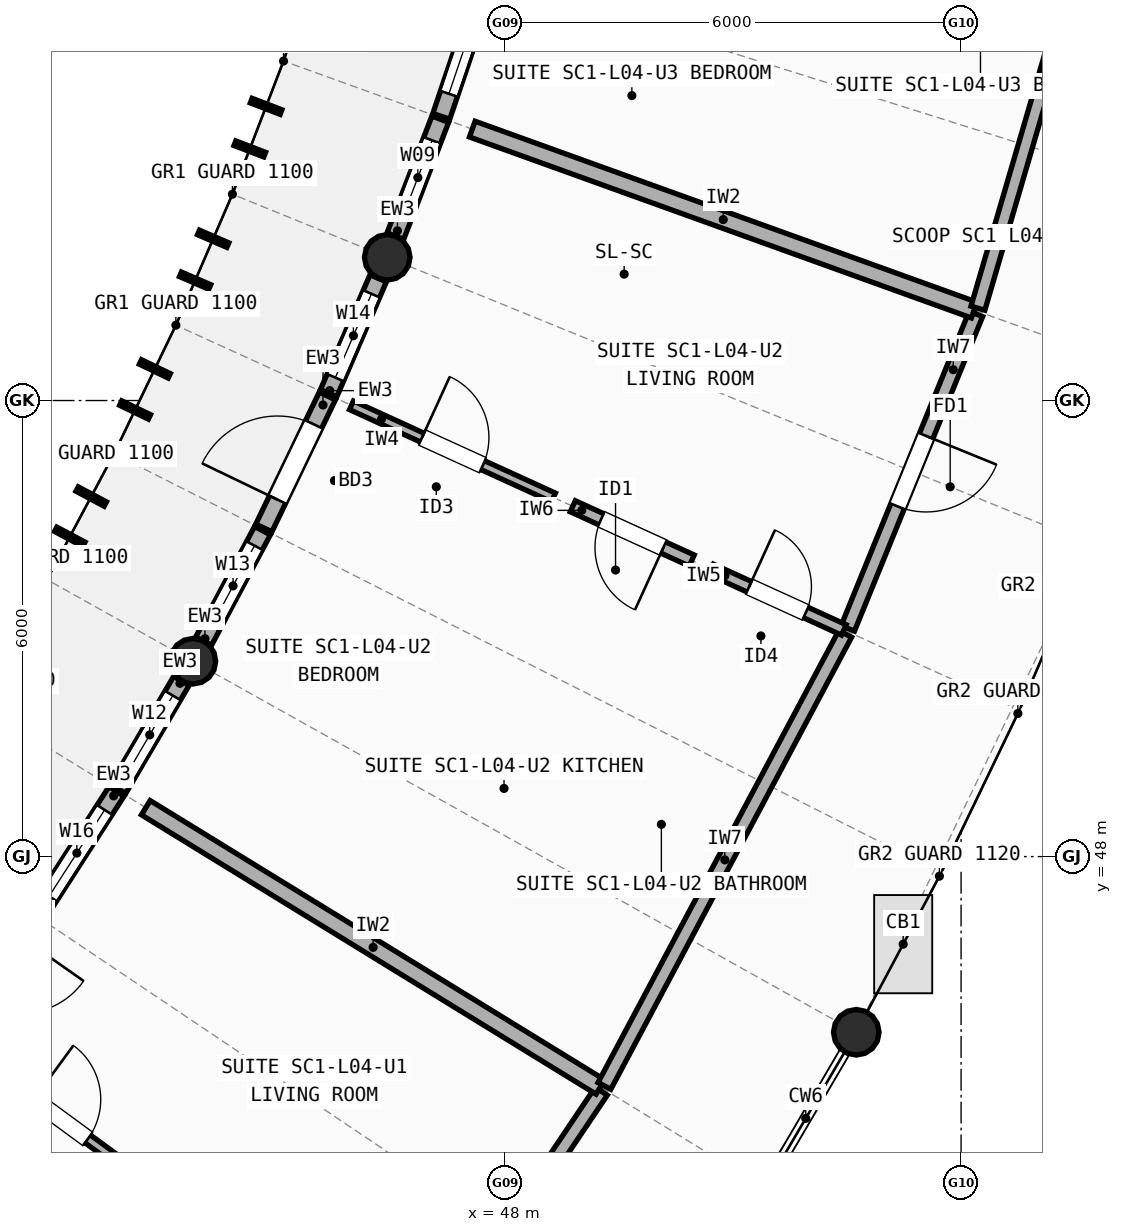
"""IFC4 building model, lengths in metres.
Left out: names, types, materials, properties, quantities, classifications, styles, units other than length and angle.
Written with IfcOpenShell. Run it as: python <this file> out.ifc"""

import sys

from ifc_helpers import new_model, si_unit, direction, frame, frame_2d, origin, origin_2d, place, context, subcontext, project, spatial, rectangle, circle, extrude, element, fill, save


model = new_model("IFC4")
c1 = context("Model", 3, precision=1e-05, world=origin(), true_north=direction((0.0, 1.0)))
c2 = subcontext(c1, "Body", "Model", "MODEL_VIEW")
j1 = project(units=[si_unit("LENGTHUNIT", "METRE"), si_unit("PLANEANGLEUNIT", "RADIAN")], contexts=[c1])
p1 = place(None, origin())
s1 = spatial("IfcSite", under=j1, at=p1, CompositionType="ELEMENT")
p2 = place(p1, origin())
s2 = spatial("IfcBuilding", under=s1, at=p2, CompositionType="ELEMENT")
p3 = place(p2, frame((0.0, 0.0, 14.1)))
s3 = spatial("IfcBuildingStorey", under=s2, at=p3, CompositionType="ELEMENT", Elevation=14.1)
for number, where, z_axis, x_axis in (
    (1, (43.893, 50.57, 0.0), (0.0, 0.0, 1.0), (1.0, 0.0, 0.0)),
    (2, (52.621, 45.689, 0.0), (0.0, 0.0, 1.0), (1.0, 0.0, 0.0)),
    (3, (46.45, 55.884, 0.0), (0.0, 0.0, 1.0), (1.0, 0.0, 0.0)),
):
    element("IfcColumn", number, at=place(p3, frame(where, z_axis=z_axis, x_axis=x_axis)), inside=s3, PredefinedType="COLUMN", context=c2, shape_type="SweptSolid", body=[
        extrude(circle(Radius=0.3, at=origin_2d()), origin(), (0.0, 0.0, 1.0), 2.948),
    ])
p4 = place(p3, frame((41.845, 47.236, 0.0), z_axis=(0.0, 0.0, 1.0), x_axis=(0.540911277163, 0.841079657486, 0.0)))
e4 = element("IfcWall", 4, at=p4, inside=s3, PredefinedType="STANDARD", context=c2, shape_type="SweptSolid", body=[
    extrude(rectangle(XDim=1.927, YDim=0.235, at=frame_2d((0.963, 0.0))), origin(), (0.0, 0.0, 1.0), 2.684),
])
p5 = place(p4, frame((0.288, 0.0, 0.85)))
e5 = element("IfcOpeningElement", 5, at=p5, cuts=e4, PredefinedType="OPENING", context=c2, shape_type="SweptSolid", body=[
    extrude(rectangle(XDim=1.35, YDim=1.5, at=frame_2d((0.675, 0.75))), frame((0.0, 0.127, 0.0), z_axis=(0.0, -1.0, 0.0), x_axis=(1.0, 0.0, 0.0)), (0.0, 0.0, 1.0), 0.255),
])
p6 = place(p3, frame((42.908, 48.891, 0.0), z_axis=(0.0, 0.0, 1.0), x_axis=(0.505879302059, 0.862604272971, 0.0)))
e6 = element("IfcWall", 6, at=p6, inside=s3, PredefinedType="STANDARD", context=c2, shape_type="SweptSolid", body=[
    extrude(rectangle(XDim=1.647, YDim=0.235, at=frame_2d((0.823, 0.0))), origin(), (0.0, 0.0, 1.0), 2.684),
])
p7 = place(p6, frame((0.223, 0.0, 0.85)))
e7 = element("IfcOpeningElement", 7, at=p7, cuts=e6, PredefinedType="OPENING", context=c2, shape_type="SweptSolid", body=[
    extrude(rectangle(XDim=1.2, YDim=1.35, at=frame_2d((0.6, 0.675))), frame((0.0, 0.127, 0.0), z_axis=(0.0, -1.0, 0.0), x_axis=(1.0, 0.0, 0.0)), (0.0, 0.0, 1.0), 0.255),
])
p8 = place(p3, frame((44.034, 50.835, 0.0), z_axis=(0.0, 0.0, 1.0), x_axis=(0.470134157171, 0.882594966143, 0.0)))
e8 = element("IfcWall", 8, at=p8, inside=s3, PredefinedType="STANDARD", context=c2, shape_type="SweptSolid", body=[
    extrude(rectangle(XDim=1.647, YDim=0.235, at=frame_2d((0.823, 0.0))), origin(), (0.0, 0.0, 1.0), 2.684),
])
p9 = place(p8, frame((0.223, 0.0, 0.85)))
e9 = element("IfcOpeningElement", 9, at=p9, cuts=e8, PredefinedType="OPENING", context=c2, shape_type="SweptSolid", body=[
    extrude(rectangle(XDim=1.2, YDim=1.45, at=frame_2d((0.6, 0.725))), frame((0.0, 0.127, 0.0), z_axis=(0.0, -1.0, 0.0), x_axis=(1.0, 0.0, 0.0)), (0.0, 0.0, 1.0), 0.255),
])
p10 = place(p3, frame((44.826, 52.324, 0.0), z_axis=(0.0, 0.0, 1.0), x_axis=(0.433579410465, 0.90111536155, 0.0)))
e10 = element("IfcWall", 10, at=p10, inside=s3, PredefinedType="STANDARD", context=c2, shape_type="SweptSolid", body=[
    extrude(rectangle(XDim=1.927, YDim=0.235, at=frame_2d((0.963, 0.0))), origin(), (0.0, 0.0, 1.0), 2.684),
])
p11 = place(p10, frame((0.413, 0.0, 0.0)))
e11 = element("IfcOpeningElement", 11, at=p11, cuts=e10, PredefinedType="OPENING", context=c2, shape_type="SweptSolid", body=[
    extrude(rectangle(XDim=1.1, YDim=2.15, at=frame_2d((0.55, 1.075))), frame((0.0, 0.127, 0.0), z_axis=(0.0, -1.0, 0.0), x_axis=(1.0, 0.0, 0.0)), (0.0, 0.0, 1.0), 0.255),
])
p12 = place(p3, frame((45.678, 54.097, 0.0), z_axis=(0.0, 0.0, 1.0), x_axis=(0.396333765494, 0.918106500538, 0.0)))
e12 = element("IfcWall", 12, at=p12, inside=s3, PredefinedType="STANDARD", context=c2, shape_type="SweptSolid", body=[
    extrude(rectangle(XDim=1.646, YDim=0.235, at=frame_2d((0.823, 0.0))), origin(), (0.0, 0.0, 1.0), 2.684),
])
p13 = place(p12, frame((0.223, 0.0, 0.85)))
e13 = element("IfcOpeningElement", 13, at=p13, cuts=e12, PredefinedType="OPENING", context=c2, shape_type="SweptSolid", body=[
    extrude(rectangle(XDim=1.2, YDim=1.5, at=frame_2d((0.6, 0.75))), frame((0.0, 0.127, 0.0), z_axis=(0.0, -1.0, 0.0), x_axis=(1.0, 0.0, 0.0)), (0.0, 0.0, 1.0), 0.255),
])
p14 = place(p3, frame((46.558, 56.164, 0.0), z_axis=(0.0, 0.0, 1.0), x_axis=(0.358343161541, 0.933589941343, 0.0)))
e14 = element("IfcWall", 14, at=p14, inside=s3, PredefinedType="STANDARD", context=c2, shape_type="SweptSolid", body=[
    extrude(rectangle(XDim=1.647, YDim=0.235, at=frame_2d((0.823, 0.0))), origin(), (0.0, 0.0, 1.0), 2.684),
])
p15 = place(p14, frame((0.298, 0.0, 0.85)))
e15 = element("IfcOpeningElement", 15, at=p15, cuts=e14, PredefinedType="OPENING", context=c2, shape_type="SweptSolid", body=[
    extrude(rectangle(XDim=1.05, YDim=1.35, at=frame_2d((0.525, 0.675))), frame((0.0, 0.127, 0.0), z_axis=(0.0, -1.0, 0.0), x_axis=(1.0, 0.0, 0.0)), (0.0, 0.0, 1.0), 0.255),
])
p16 = place(p3, frame((47.161, 57.739, 0.0), z_axis=(0.0, 0.0, 1.0), x_axis=(0.319798549746, 0.947485560618, 0.0)))
e16 = element("IfcWall", 16, at=p16, inside=s3, PredefinedType="STANDARD", context=c2, shape_type="SweptSolid", body=[
    extrude(rectangle(XDim=1.927, YDim=0.235, at=frame_2d((0.963, 0.0))), origin(), (0.0, 0.0, 1.0), 2.684),
])
p17 = place(p16, frame((0.313, 0.0, 0.85)))
e17 = element("IfcOpeningElement", 17, at=p17, cuts=e16, PredefinedType="OPENING", context=c2, shape_type="SweptSolid", body=[
    extrude(rectangle(XDim=1.3, YDim=1.45, at=frame_2d((0.65, 0.725))), frame((0.0, 0.127, 0.0), z_axis=(0.0, -1.0, 0.0), x_axis=(1.0, 0.0, 0.0)), (0.0, 0.0, 1.0), 0.255),
])
p18 = place(p3, frame((46.774, 41.207, 0.0), z_axis=(0.0, 0.0, 1.0), x_axis=(0.55793724224, 0.829883144619, 0.0)))
e18 = element("IfcWall", 18, at=p18, inside=s3, PredefinedType="SOLIDWALL", context=c2, shape_type="SweptSolid", body=[
    extrude(rectangle(XDim=4.467, YDim=0.19, at=frame_2d((2.234, 0.0))), origin(), (0.0, 0.0, 1.0), 2.742),
])
p19 = place(p18, frame((1.708, 0.0, 0.0)))
e19 = element("IfcOpeningElement", 19, at=p19, cuts=e18, PredefinedType="OPENING", context=c2, shape_type="SweptSolid", body=[
    extrude(rectangle(XDim=1.05, YDim=2.15, at=frame_2d((0.525, 1.075))), frame((0.0, 0.105, 0.0), z_axis=(0.0, -1.0, 0.0), x_axis=(1.0, 0.0, 0.0)), (0.0, 0.0, 1.0), 0.21),
])
p20 = place(p3, frame((40.978, 45.409, 0.0), z_axis=(0.0, 0.0, 1.0), x_axis=(0.806306627453, -0.591497778969, 0.0)))
e20 = element("IfcWall", 20, at=p20, inside=s3, PredefinedType="PARTITIONING", context=c2, shape_type="SweptSolid", body=[
    extrude(rectangle(XDim=2.92, YDim=0.125, at=frame_2d((1.46, 0.0))), origin(), (0.0, 0.0, 1.0), 2.722),
])
p21 = place(p20, frame((1.02, 0.0, 0.0)))
e21 = element("IfcOpeningElement", 21, at=p21, cuts=e20, PredefinedType="OPENING", context=c2, shape_type="SweptSolid", body=[
    extrude(rectangle(XDim=0.88, YDim=2.1, at=frame_2d((0.44, 1.05))), frame((0.0, 0.073, 0.0), z_axis=(0.0, -1.0, 0.0), x_axis=(1.0, 0.0, 0.0)), (0.0, 0.0, 1.0), 0.145),
])
p22 = place(p3, frame((43.273, 48.643, 0.0), z_axis=(0.0, 0.0, 1.0), x_axis=(0.852035433886, -0.523484115713, 0.0)))
e22 = element("IfcWall", 22, at=p22, inside=s3, PredefinedType="SOLIDWALL", context=c2, shape_type="SweptSolid", body=[
    extrude(rectangle(XDim=7.02, YDim=0.22, at=frame_2d((3.51, 0.0))), origin(), (0.0, 0.0, 1.0), 2.762),
])
p23 = place(p3, frame((49.307, 44.983, 0.0), z_axis=(0.0, 0.0, 1.0), x_axis=(0.47013685006, 0.88259353171, 0.0)))
e23 = element("IfcWall", 23, at=p23, inside=s3, PredefinedType="SOLIDWALL", context=c2, shape_type="SweptSolid", body=[
    extrude(rectangle(XDim=6.738, YDim=0.19, at=frame_2d((3.369, 0.0))), origin(), (0.0, 0.0, 1.0), 2.722),
])
p24 = place(p3, frame((52.509, 51.002, 0.0), z_axis=(0.0, 0.0, 1.0), x_axis=(0.377413192487, 0.926044967665, 0.0)))
e24 = element("IfcWall", 24, at=p24, inside=s3, PredefinedType="SOLIDWALL", context=c2, shape_type="SweptSolid", body=[
    extrude(rectangle(XDim=4.467, YDim=0.19, at=frame_2d((2.234, 0.0))), origin(), (0.0, 0.0, 1.0), 2.722),
])
p25 = place(p24, frame((1.734, 0.0, 0.0)))
e25 = element("IfcOpeningElement", 25, at=p25, cuts=e24, PredefinedType="OPENING", context=c2, shape_type="SweptSolid", body=[
    extrude(rectangle(XDim=1.0, YDim=2.15, at=frame_2d((0.5, 1.075))), frame((0.0, 0.105, 0.0), z_axis=(0.0, -1.0, 0.0), x_axis=(1.0, 0.0, 0.0)), (0.0, 0.0, 1.0), 0.21),
])
p26 = place(p3, frame((45.98, 53.937, 0.0), z_axis=(0.0, 0.0, 1.0), x_axis=(0.909795784273, -0.415056178029, 0.0)))
e26 = element("IfcWall", 26, at=p26, inside=s3, PredefinedType="PARTITIONING", context=c2, shape_type="SweptSolid", body=[
    extrude(rectangle(XDim=2.92, YDim=0.125, at=frame_2d((1.46, 0.0))), origin(), (0.0, 0.0, 1.0), 2.762),
])
p27 = place(p26, frame((1.02, 0.0, 0.0)))
e27 = element("IfcOpeningElement", 27, at=p27, cuts=e26, PredefinedType="OPENING", context=c2, shape_type="SweptSolid", body=[
    extrude(rectangle(XDim=0.88, YDim=2.1, at=frame_2d((0.44, 1.05))), frame((0.0, 0.073, 0.0), z_axis=(0.0, -1.0, 0.0), x_axis=(1.0, 0.0, 0.0)), (0.0, 0.0, 1.0), 0.145),
])
p28 = place(p3, frame((48.891, 52.609, 0.0), z_axis=(0.0, 0.0, 1.0), x_axis=(0.909787074161, -0.415075269909, 0.0)))
e28 = element("IfcWall", 28, at=p28, inside=s3, PredefinedType="PLUMBINGWALL", context=c2, shape_type="SweptSolid", body=[
    extrude(rectangle(XDim=1.72, YDim=0.16, at=frame_2d((0.86, 0.0))), origin(), (0.0, 0.0, 1.0), 2.762),
])
p29 = place(p28, frame((0.41, 0.0, 0.0)))
e29 = element("IfcOpeningElement", 29, at=p29, cuts=e28, PredefinedType="OPENING", context=c2, shape_type="SweptSolid", body=[
    extrude(rectangle(XDim=0.9, YDim=2.1, at=frame_2d((0.45, 1.05))), frame((0.0, 0.09, 0.0), z_axis=(0.0, -1.0, 0.0), x_axis=(1.0, 0.0, 0.0)), (0.0, 0.0, 1.0), 0.18),
])
p30 = place(p3, frame((50.711, 51.779, 0.0), z_axis=(0.0, 0.0, 1.0), x_axis=(0.90980388611, -0.415038418485, 0.0)))
e30 = element("IfcWall", 30, at=p30, inside=s3, PredefinedType="PARTITIONING", context=c2, shape_type="SweptSolid", body=[
    extrude(rectangle(XDim=1.92, YDim=0.15, at=frame_2d((0.96, 0.0))), origin(), (0.0, 0.0, 1.0), 2.762),
])
p31 = place(p30, frame((0.55, 0.0, 0.0)))
e31 = element("IfcOpeningElement", 31, at=p31, cuts=e30, PredefinedType="OPENING", context=c2, shape_type="SweptSolid", body=[
    extrude(rectangle(XDim=0.82, YDim=2.08, at=frame_2d((0.41, 1.04))), frame((0.0, 0.085, 0.0), z_axis=(0.0, -1.0, 0.0), x_axis=(1.0, 0.0, 0.0)), (0.0, 0.0, 1.0), 0.17),
])
p32 = place(p3, frame((47.569, 57.571, 0.0), z_axis=(0.0, 0.0, 1.0), x_axis=(0.940728143869, -0.339161553441, 0.0)))
e32 = element("IfcWall", 32, at=p32, inside=s3, PredefinedType="SOLIDWALL", context=c2, shape_type="SweptSolid", body=[
    extrude(rectangle(XDim=7.02, YDim=0.22, at=frame_2d((3.51, 0.0))), origin(), (0.0, 0.0, 1.0), 2.742),
])
p33 = place(p3, frame((54.221, 55.215, 0.0), z_axis=(0.0, 0.0, 1.0), x_axis=(0.280749798049, 0.95978099111, 0.0)))
e33 = element("IfcWall", 33, at=p33, inside=s3, PredefinedType="SOLIDWALL", context=c2, shape_type="SweptSolid", body=[
    extrude(rectangle(XDim=6.739, YDim=0.19, at=frame_2d((3.369, 0.0))), origin(), (0.0, 0.0, 1.0), 2.722),
])
p34 = place(p5, origin())
e34 = element("IfcWindow", 34, at=p34, inside=s3, PartitioningType="SINGLE_PANEL", PredefinedType="WINDOW", context=c2, shape_type="SweptSolid", body=[
    extrude(rectangle(XDim=1.35, YDim=1.5, at=frame_2d((0.675, 0.75))), frame((0.0, 0.03, 0.0), z_axis=(0.0, -1.0, 0.0), x_axis=(1.0, 0.0, 0.0)), (0.0, 0.0, 1.0), 0.06),
])
fill(e5, e34)
p35 = place(p7, origin())
e35 = element("IfcWindow", 35, at=p35, inside=s3, PartitioningType="SINGLE_PANEL", PredefinedType="WINDOW", context=c2, shape_type="SweptSolid", body=[
    extrude(rectangle(XDim=1.2, YDim=1.35, at=frame_2d((0.6, 0.675))), frame((0.0, 0.03, 0.0), z_axis=(0.0, -1.0, 0.0), x_axis=(1.0, 0.0, 0.0)), (0.0, 0.0, 1.0), 0.06),
])
fill(e7, e35)
p36 = place(p9, origin())
e36 = element("IfcWindow", 36, at=p36, inside=s3, PartitioningType="SINGLE_PANEL", PredefinedType="WINDOW", context=c2, shape_type="SweptSolid", body=[
    extrude(rectangle(XDim=1.2, YDim=1.45, at=frame_2d((0.6, 0.725))), frame((0.0, 0.03, 0.0), z_axis=(0.0, -1.0, 0.0), x_axis=(1.0, 0.0, 0.0)), (0.0, 0.0, 1.0), 0.06),
])
fill(e9, e36)
p37 = place(p11, origin())
e37 = element("IfcDoor", 37, at=p37, inside=s3, OperationType="SINGLE_SWING_LEFT", PredefinedType="DOOR", context=c2, shape_type="SweptSolid", body=[
    extrude(rectangle(XDim=1.1, YDim=2.15, at=frame_2d((0.55, 1.075))), frame((0.0, 0.025, 0.0), z_axis=(0.0, -1.0, 0.0), x_axis=(1.0, 0.0, 0.0)), (0.0, 0.0, 1.0), 0.05),
])
fill(e11, e37)
p38 = place(p13, origin())
e38 = element("IfcWindow", 38, at=p38, inside=s3, PartitioningType="SINGLE_PANEL", PredefinedType="WINDOW", context=c2, shape_type="SweptSolid", body=[
    extrude(rectangle(XDim=1.2, YDim=1.5, at=frame_2d((0.6, 0.75))), frame((0.0, 0.03, 0.0), z_axis=(0.0, -1.0, 0.0), x_axis=(1.0, 0.0, 0.0)), (0.0, 0.0, 1.0), 0.06),
])
fill(e13, e38)
p39 = place(p15, origin())
e39 = element("IfcWindow", 39, at=p39, inside=s3, PartitioningType="SINGLE_PANEL", PredefinedType="WINDOW", context=c2, shape_type="SweptSolid", body=[
    extrude(rectangle(XDim=1.05, YDim=1.35, at=frame_2d((0.525, 0.675))), frame((0.0, 0.03, 0.0), z_axis=(0.0, -1.0, 0.0), x_axis=(1.0, 0.0, 0.0)), (0.0, 0.0, 1.0), 0.06),
])
fill(e15, e39)
p40 = place(p17, origin())
e40 = element("IfcWindow", 40, at=p40, inside=s3, PartitioningType="SINGLE_PANEL", PredefinedType="WINDOW", context=c2, shape_type="SweptSolid", body=[
    extrude(rectangle(XDim=1.3, YDim=1.45, at=frame_2d((0.65, 0.725))), frame((0.0, 0.03, 0.0), z_axis=(0.0, -1.0, 0.0), x_axis=(1.0, 0.0, 0.0)), (0.0, 0.0, 1.0), 0.06),
])
fill(e17, e40)
p41 = place(p21, origin())
e41 = element("IfcDoor", 41, at=p41, inside=s3, OperationType="SINGLE_SWING_LEFT", PredefinedType="DOOR", context=c2, shape_type="SweptSolid", body=[
    extrude(rectangle(XDim=0.88, YDim=2.1, at=frame_2d((0.44, 1.05))), frame((0.0, 0.025, 0.0), z_axis=(0.0, -1.0, 0.0), x_axis=(1.0, 0.0, 0.0)), (0.0, 0.0, 1.0), 0.05),
])
fill(e21, e41)
p42 = place(p25, origin())
e42 = element("IfcDoor", 42, at=p42, inside=s3, OperationType="SINGLE_SWING_RIGHT", PredefinedType="DOOR", context=c2, shape_type="SweptSolid", body=[
    extrude(rectangle(XDim=1.0, YDim=2.15, at=frame_2d((0.5, 1.075))), frame((0.0, 0.025, 0.0), z_axis=(0.0, -1.0, 0.0), x_axis=(1.0, 0.0, 0.0)), (0.0, 0.0, 1.0), 0.05),
])
fill(e25, e42)
p43 = place(p27, origin())
e43 = element("IfcDoor", 43, at=p43, inside=s3, OperationType="SINGLE_SWING_LEFT", PredefinedType="DOOR", context=c2, shape_type="SweptSolid", body=[
    extrude(rectangle(XDim=0.88, YDim=2.1, at=frame_2d((0.44, 1.05))), frame((0.0, 0.025, 0.0), z_axis=(0.0, -1.0, 0.0), x_axis=(1.0, 0.0, 0.0)), (0.0, 0.0, 1.0), 0.05),
])
fill(e27, e43)
p44 = place(p29, origin())
e44 = element("IfcDoor", 44, at=p44, inside=s3, OperationType="SINGLE_SWING_RIGHT", PredefinedType="DOOR", context=c2, shape_type="SweptSolid", body=[
    extrude(rectangle(XDim=0.9, YDim=2.1, at=frame_2d((0.45, 1.05))), frame((0.0, 0.025, 0.0), z_axis=(0.0, -1.0, 0.0), x_axis=(1.0, 0.0, 0.0)), (0.0, 0.0, 1.0), 0.05),
])
fill(e29, e44)
p45 = place(p31, origin())
e45 = element("IfcDoor", 45, at=p45, inside=s3, OperationType="SINGLE_SWING_LEFT", PredefinedType="DOOR", context=c2, shape_type="SweptSolid", body=[
    extrude(rectangle(XDim=0.82, YDim=2.08, at=frame_2d((0.41, 1.04))), frame((0.0, 0.025, 0.0), z_axis=(0.0, -1.0, 0.0), x_axis=(1.0, 0.0, 0.0)), (0.0, 0.0, 1.0), 0.05),
])
fill(e31, e45)
save(model, sys.argv[1])
